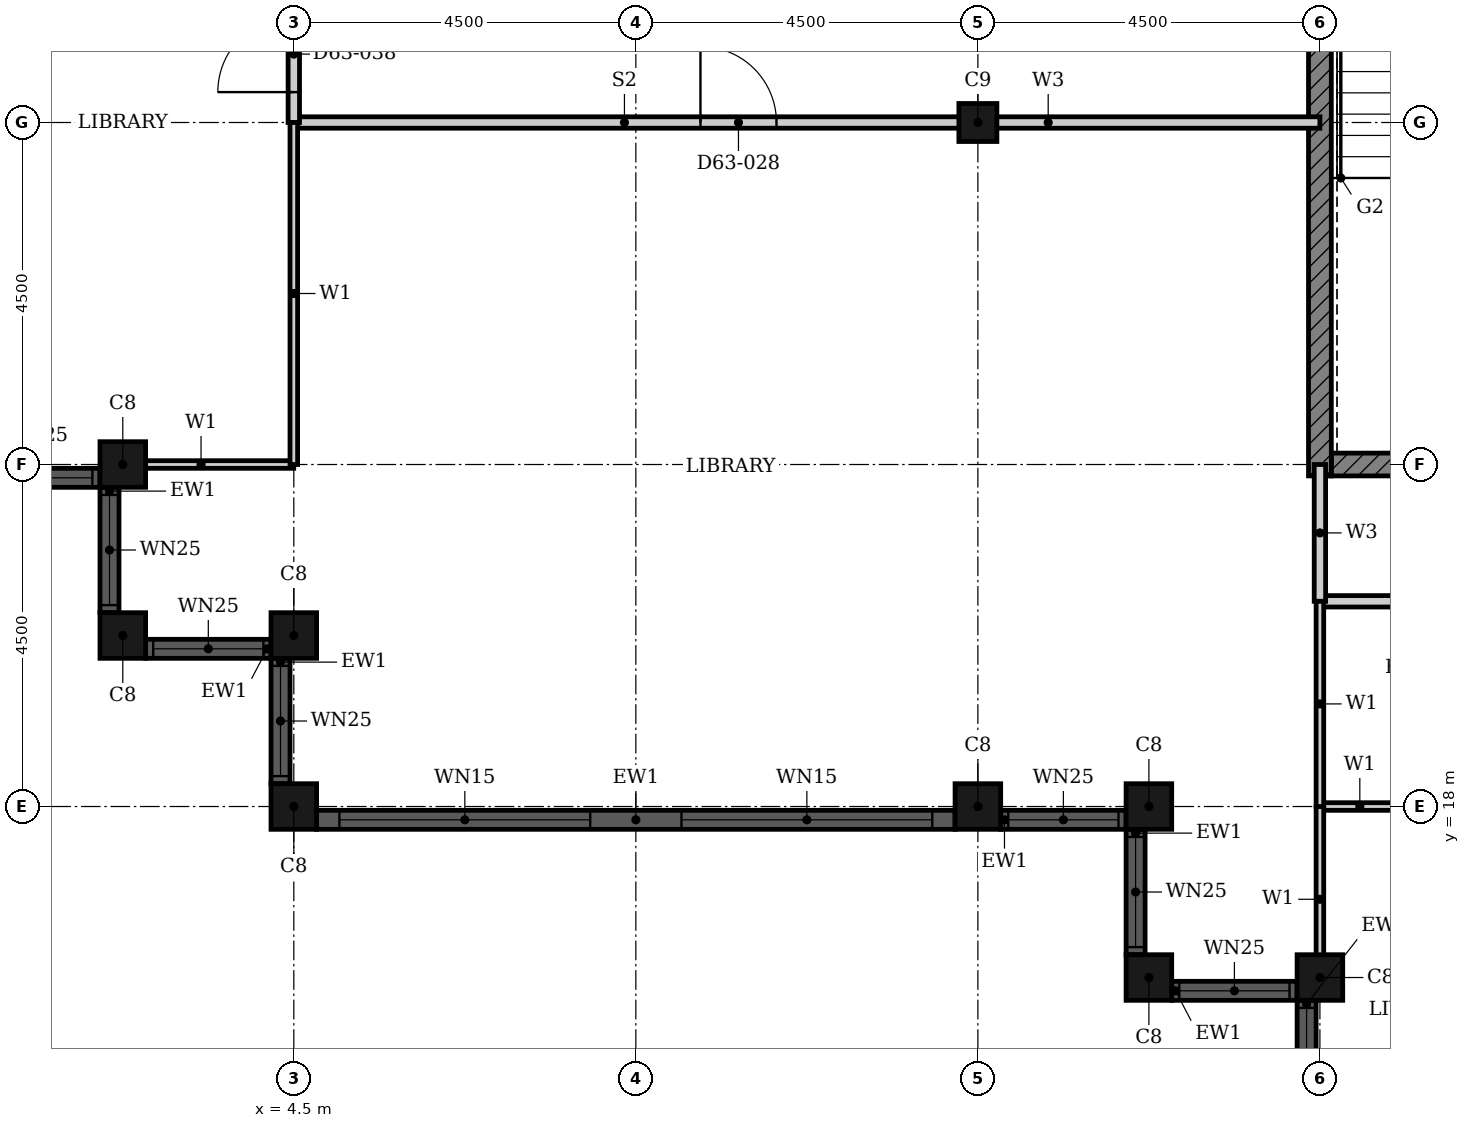
"""IFC4 building model, lengths in metres.
Left out: names, types, materials, properties, quantities, classifications, styles, units other than length and angle.
Written with IfcOpenShell. Run it as: python <this file> out.ifc"""

import sys

from ifc_helpers import new_model, si_unit, direction, frame, frame_2d, origin, origin_2d, place, context, subcontext, project, spatial, rectangle, hollow_rectangle, extrude, element, fill, save


model = new_model("IFC4")
c1 = context("Model", 3, precision=1e-05, world=origin(), true_north=direction((0.0, 1.0)))
c2 = subcontext(c1, "Body", "Model", "MODEL_VIEW")
j1 = project(units=[si_unit("LENGTHUNIT", "METRE"), si_unit("PLANEANGLEUNIT", "RADIAN")], contexts=[c1])
p1 = place(None, origin())
s1 = spatial("IfcSite", under=j1, at=p1, CompositionType="ELEMENT")
p2 = place(p1, origin())
s2 = spatial("IfcBuilding", under=s1, at=p2, CompositionType="ELEMENT")
p3 = place(p2, frame((0.0, 0.0, 249.0)))
s3 = spatial("IfcBuildingStorey", under=s2, at=p3, CompositionType="ELEMENT", Elevation=249.0)
for number, where, z_axis, x_axis in (
    (1, (15.75, 18.0, 0.0), (0.0, 0.0, 1.0), (1.0, 0.0, 0.0)),
    (2, (15.75, 15.75, 0.0), (0.0, 0.0, 1.0), (1.0, 0.0, 0.0)),
    (3, (18.0, 15.75, 0.0), (0.0, 0.0, 1.0), (1.0, 0.0, 0.0)),
    (4, (2.25, 22.5, 0.0), (0.0, 0.0, 1.0), (1.0, 0.0, 0.0)),
    (5, (2.25, 20.25, 0.0), (0.0, 0.0, 1.0), (1.0, 0.0, 0.0)),
    (6, (4.5, 20.25, 0.0), (0.0, 0.0, 1.0), (1.0, 0.0, 0.0)),
    (7, (4.5, 18.0, 0.0), (0.0, 0.0, 1.0), (1.0, 0.0, 0.0)),
    (8, (13.5, 18.0, 0.0), (0.0, 0.0, 1.0), (1.0, 0.0, 0.0)),
):
    element("IfcColumn", number, at=place(p3, frame(where, z_axis=z_axis, x_axis=x_axis)), inside=s3, PredefinedType="COLUMN", context=c2, shape_type="SweptSolid", body=[
        extrude(hollow_rectangle(XDim=0.6, YDim=0.6, WallThickness=0.02, at=origin_2d()), origin(), (0.0, 0.0, 1.0), 3.7),
    ])
p4 = place(p3, frame((13.5, 27.0, 0.0), z_axis=(0.0, 0.0, 1.0), x_axis=(1.0, 0.0, 0.0)))
e9 = element("IfcColumn", 9, at=p4, inside=s3, PredefinedType="COLUMN", context=c2, shape_type="SweptSolid", body=[
    extrude(hollow_rectangle(XDim=0.5, YDim=0.5, WallThickness=0.016, InnerFilletRadius=0.032, OuterFilletRadius=0.048, at=origin_2d()), origin(), (0.0, 0.0, 1.0), 3.7),
])
p5 = place(p3, frame((15.575, 17.7, 0.0), z_axis=(0.0, 0.0, 1.0), x_axis=(0.0, -1.0, 0.0)))
e10 = element("IfcWall", 10, at=p5, inside=s3, PredefinedType="SOLIDWALL", context=c2, shape_type="SweptSolid", body=[
    extrude(rectangle(XDim=1.65, YDim=0.25, at=frame_2d((0.825, 0.0))), origin(), (0.0, 0.0, 1.0), 3.7),
])
p6 = place(p5, frame((0.1, 0.0, 0.9)))
e11 = element("IfcOpeningElement", 11, at=p6, cuts=e10, PredefinedType="OPENING", context=c2, shape_type="SweptSolid", body=[
    extrude(rectangle(XDim=1.45, YDim=1.85, at=frame_2d((0.725, 0.925))), frame((0.0, 0.135, 0.0), z_axis=(0.0, -1.0, 0.0), x_axis=(1.0, 0.0, 0.0)), (0.0, 0.0, 1.0), 0.27),
])
p7 = place(p3, frame((16.05, 15.575, 0.0), z_axis=(0.0, 0.0, 1.0), x_axis=(1.0, 0.0, 0.0)))
e12 = element("IfcWall", 12, at=p7, inside=s3, PredefinedType="SOLIDWALL", context=c2, shape_type="SweptSolid", body=[
    extrude(rectangle(XDim=1.65, YDim=0.25, at=frame_2d((0.825, 0.0))), origin(), (0.0, 0.0, 1.0), 3.7),
])
p8 = place(p7, frame((0.1, 0.0, 0.9)))
e13 = element("IfcOpeningElement", 13, at=p8, cuts=e12, PredefinedType="OPENING", context=c2, shape_type="SweptSolid", body=[
    extrude(rectangle(XDim=1.45, YDim=1.85, at=frame_2d((0.725, 0.925))), frame((0.0, 0.135, 0.0), z_axis=(0.0, -1.0, 0.0), x_axis=(1.0, 0.0, 0.0)), (0.0, 0.0, 1.0), 0.27),
])
p9 = place(p3, frame((17.825, 15.45, 0.0), z_axis=(0.0, 0.0, 1.0), x_axis=(0.0, -1.0, 0.0)))
e14 = element("IfcWall", 14, at=p9, inside=s3, PredefinedType="SOLIDWALL", context=c2, shape_type="SweptSolid", body=[
    extrude(rectangle(XDim=1.65, YDim=0.25, at=frame_2d((0.825, 0.0))), origin(), (0.0, 0.0, 1.0), 3.7),
])
p10 = place(p9, frame((0.1, 0.0, 0.9)))
e15 = element("IfcOpeningElement", 15, at=p10, cuts=e14, PredefinedType="OPENING", context=c2, shape_type="SweptSolid", body=[
    extrude(rectangle(XDim=1.45, YDim=1.85, at=frame_2d((0.725, 0.925))), frame((0.0, 0.135, 0.0), z_axis=(0.0, -1.0, 0.0), x_axis=(1.0, 0.0, 0.0)), (0.0, 0.0, 1.0), 0.27),
])
p11 = place(p3, frame((0.3, 22.325, 0.0), z_axis=(0.0, 0.0, 1.0), x_axis=(1.0, 0.0, 0.0)))
e16 = element("IfcWall", 16, at=p11, inside=s3, PredefinedType="SOLIDWALL", context=c2, shape_type="SweptSolid", body=[
    extrude(rectangle(XDim=1.65, YDim=0.25, at=frame_2d((0.825, 0.0))), origin(), (0.0, 0.0, 1.0), 3.7),
])
p12 = place(p11, frame((0.1, 0.0, 0.9)))
e17 = element("IfcOpeningElement", 17, at=p12, cuts=e16, PredefinedType="OPENING", context=c2, shape_type="SweptSolid", body=[
    extrude(rectangle(XDim=1.45, YDim=1.85, at=frame_2d((0.725, 0.925))), frame((0.0, 0.135, 0.0), z_axis=(0.0, -1.0, 0.0), x_axis=(1.0, 0.0, 0.0)), (0.0, 0.0, 1.0), 0.27),
])
p13 = place(p3, frame((2.075, 22.2, 0.0), z_axis=(0.0, 0.0, 1.0), x_axis=(0.0, -1.0, 0.0)))
e18 = element("IfcWall", 18, at=p13, inside=s3, PredefinedType="SOLIDWALL", context=c2, shape_type="SweptSolid", body=[
    extrude(rectangle(XDim=1.65, YDim=0.25, at=frame_2d((0.825, 0.0))), origin(), (0.0, 0.0, 1.0), 3.7),
])
p14 = place(p13, frame((0.1, 0.0, 0.9)))
e19 = element("IfcOpeningElement", 19, at=p14, cuts=e18, PredefinedType="OPENING", context=c2, shape_type="SweptSolid", body=[
    extrude(rectangle(XDim=1.45, YDim=1.85, at=frame_2d((0.725, 0.925))), frame((0.0, 0.135, 0.0), z_axis=(0.0, -1.0, 0.0), x_axis=(1.0, 0.0, 0.0)), (0.0, 0.0, 1.0), 0.27),
])
p15 = place(p3, frame((2.55, 20.075, 0.0), z_axis=(0.0, 0.0, 1.0), x_axis=(1.0, 0.0, 0.0)))
e20 = element("IfcWall", 20, at=p15, inside=s3, PredefinedType="SOLIDWALL", context=c2, shape_type="SweptSolid", body=[
    extrude(rectangle(XDim=1.65, YDim=0.25, at=frame_2d((0.825, 0.0))), origin(), (0.0, 0.0, 1.0), 3.7),
])
p16 = place(p15, frame((0.1, 0.0, 0.9)))
e21 = element("IfcOpeningElement", 21, at=p16, cuts=e20, PredefinedType="OPENING", context=c2, shape_type="SweptSolid", body=[
    extrude(rectangle(XDim=1.45, YDim=1.85, at=frame_2d((0.725, 0.925))), frame((0.0, 0.135, 0.0), z_axis=(0.0, -1.0, 0.0), x_axis=(1.0, 0.0, 0.0)), (0.0, 0.0, 1.0), 0.27),
])
p17 = place(p3, frame((4.325, 19.95, 0.0), z_axis=(0.0, 0.0, 1.0), x_axis=(0.0, -1.0, 0.0)))
e22 = element("IfcWall", 22, at=p17, inside=s3, PredefinedType="SOLIDWALL", context=c2, shape_type="SweptSolid", body=[
    extrude(rectangle(XDim=1.65, YDim=0.25, at=frame_2d((0.825, 0.0))), origin(), (0.0, 0.0, 1.0), 3.7),
])
p18 = place(p17, frame((0.1, 0.0, 0.9)))
e23 = element("IfcOpeningElement", 23, at=p18, cuts=e22, PredefinedType="OPENING", context=c2, shape_type="SweptSolid", body=[
    extrude(rectangle(XDim=1.45, YDim=1.85, at=frame_2d((0.725, 0.925))), frame((0.0, 0.135, 0.0), z_axis=(0.0, -1.0, 0.0), x_axis=(1.0, 0.0, 0.0)), (0.0, 0.0, 1.0), 0.27),
])
p19 = place(p3, frame((4.8, 17.825, 0.0), z_axis=(0.0, 0.0, 1.0), x_axis=(1.0, 0.0, 0.0)))
e24 = element("IfcWall", 24, at=p19, inside=s3, PredefinedType="SOLIDWALL", context=c2, shape_type="SweptSolid", body=[
    extrude(rectangle(XDim=8.4, YDim=0.25, at=frame_2d((4.2, 0.0))), origin(), (0.0, 0.0, 1.0), 3.7),
])
p20 = place(p19, frame((0.3, 0.0, 0.45)))
e25 = element("IfcOpeningElement", 25, at=p20, cuts=e24, PredefinedType="OPENING", context=c2, shape_type="SweptSolid", body=[
    extrude(rectangle(XDim=3.3, YDim=2.3, at=frame_2d((1.65, 1.15))), frame((0.0, 0.135, 0.0), z_axis=(0.0, -1.0, 0.0), x_axis=(1.0, 0.0, 0.0)), (0.0, 0.0, 1.0), 0.27),
])
p21 = place(p19, frame((4.8, 0.0, 0.45)))
e26 = element("IfcOpeningElement", 26, at=p21, cuts=e24, PredefinedType="OPENING", context=c2, shape_type="SweptSolid", body=[
    extrude(rectangle(XDim=3.3, YDim=2.3, at=frame_2d((1.65, 1.15))), frame((0.0, 0.135, 0.0), z_axis=(0.0, -1.0, 0.0), x_axis=(1.0, 0.0, 0.0)), (0.0, 0.0, 1.0), 0.27),
])
p22 = place(p3, frame((13.8, 17.825, 0.0), z_axis=(0.0, 0.0, 1.0), x_axis=(1.0, 0.0, 0.0)))
e27 = element("IfcWall", 27, at=p22, inside=s3, PredefinedType="SOLIDWALL", context=c2, shape_type="SweptSolid", body=[
    extrude(rectangle(XDim=1.65, YDim=0.25, at=frame_2d((0.825, 0.0))), origin(), (0.0, 0.0, 1.0), 3.7),
])
p23 = place(p22, frame((0.1, 0.0, 0.9)))
e28 = element("IfcOpeningElement", 28, at=p23, cuts=e27, PredefinedType="OPENING", context=c2, shape_type="SweptSolid", body=[
    extrude(rectangle(XDim=1.45, YDim=1.85, at=frame_2d((0.725, 0.925))), frame((0.0, 0.135, 0.0), z_axis=(0.0, -1.0, 0.0), x_axis=(1.0, 0.0, 0.0)), (0.0, 0.0, 1.0), 0.27),
])
p24 = place(p3, frame((18.15, 22.5, 0.0), z_axis=(0.0, 0.0, 1.0), x_axis=(1.0, 0.0, 0.0)))
e29 = element("IfcWall", 29, at=p24, inside=s3, PredefinedType="SHEAR", context=c2, shape_type="SweptSolid", body=[
    extrude(rectangle(XDim=4.225, YDim=0.3, at=frame_2d((2.113, 0.0))), origin(), (0.0, 0.0, 1.0), 3.4),
])
p25 = place(p3, frame((18.0, 22.35, 0.0), z_axis=(0.0, 0.0, 1.0), x_axis=(0.0, 1.0, 0.0)))
e30 = element("IfcWall", 30, at=p25, inside=s3, PredefinedType="SHEAR", context=c2, shape_type="SweptSolid", body=[
    extrude(rectangle(XDim=9.3, YDim=0.3, at=frame_2d((4.65, 0.0))), origin(), (0.0, 0.0, 1.0), 3.4),
])
p26 = place(p3, frame((18.0, 20.7, 0.0), z_axis=(0.0, 0.0, 1.0), x_axis=(1.0, 0.0, 0.0)))
e31 = element("IfcWall", 31, at=p26, inside=s3, PredefinedType="PARTITIONING", context=c2, shape_type="SweptSolid", body=[
    extrude(rectangle(XDim=6.6, YDim=0.15, at=frame_2d((3.3, 0.0))), origin(), (0.0, 0.0, 1.0), 3.4),
])
p27 = place(p26, frame((4.3, 0.0, 0.0)))
e32 = element("IfcOpeningElement", 32, at=p27, cuts=e31, PredefinedType="OPENING", context=c2, shape_type="SweptSolid", body=[
    extrude(rectangle(XDim=1.0, YDim=2.2, at=frame_2d((0.5, 1.1))), frame((0.0, 0.085, 0.0), z_axis=(0.0, -1.0, 0.0), x_axis=(1.0, 0.0, 0.0)), (0.0, 0.0, 1.0), 0.17),
])
p28 = place(p3, frame((4.5, 27.0, 0.0), z_axis=(0.0, 0.0, 1.0), x_axis=(1.0, 0.0, 0.0)))
e33 = element("IfcWall", 33, at=p28, inside=s3, PredefinedType="PARTITIONING", context=c2, shape_type="SweptSolid", body=[
    extrude(rectangle(XDim=13.5, YDim=0.15, at=frame_2d((6.75, 0.0))), origin(), (0.0, 0.0, 1.0), 2.68),
])
p29 = place(p28, frame((5.35, 0.0, 0.0)))
e34 = element("IfcOpeningElement", 34, at=p29, cuts=e33, PredefinedType="OPENING", context=c2, shape_type="SweptSolid", body=[
    extrude(rectangle(XDim=1.0, YDim=2.1, at=frame_2d((0.5, 1.05))), frame((0.0, 0.085, 0.0), z_axis=(0.0, -1.0, 0.0), x_axis=(1.0, 0.0, 0.0)), (0.0, 0.0, 1.0), 0.17),
])
p30 = place(p3, frame((18.0, 20.7, 0.0), z_axis=(0.0, 0.0, 1.0), x_axis=(0.0, 1.0, 0.0)))
e35 = element("IfcWall", 35, at=p30, inside=s3, PredefinedType="PARTITIONING", context=c2, shape_type="SweptSolid", body=[
    extrude(rectangle(XDim=1.8, YDim=0.15, at=frame_2d((0.9, 0.0))), origin(), (0.0, 0.0, 1.0), 3.4),
])
p31 = place(p3, frame((4.5, 27.0, 0.0), z_axis=(0.0, 0.0, 1.0), x_axis=(0.0, 1.0, 0.0)))
e36 = element("IfcWall", 36, at=p31, inside=s3, PredefinedType="PARTITIONING", context=c2, shape_type="SweptSolid", body=[
    extrude(rectangle(XDim=1.8, YDim=0.15, at=frame_2d((0.9, 0.0))), origin(), (0.0, 0.0, 1.0), 3.4),
])
p32 = place(p31, frame((0.4, 0.0, 0.0)))
e37 = element("IfcOpeningElement", 37, at=p32, cuts=e36, PredefinedType="OPENING", context=c2, shape_type="SweptSolid", body=[
    extrude(rectangle(XDim=1.0, YDim=2.1, at=frame_2d((0.5, 1.05))), frame((0.0, 0.085, 0.0), z_axis=(0.0, -1.0, 0.0), x_axis=(1.0, 0.0, 0.0)), (0.0, 0.0, 1.0), 0.17),
])
p33 = place(p3, frame((18.0, 18.0, 0.0), z_axis=(0.0, 0.0, 1.0), x_axis=(1.0, 0.0, 0.0)))
e38 = element("IfcWall", 38, at=p33, inside=s3, PredefinedType="PARTITIONING", context=c2, shape_type="SweptSolid", body=[
    extrude(rectangle(XDim=3.0, YDim=0.1, at=frame_2d((1.5, 0.0))), origin(), (0.0, 0.0, 1.0), 3.4),
])
p34 = place(p33, frame((1.05, 0.0, 0.0)))
e39 = element("IfcOpeningElement", 39, at=p34, cuts=e38, PredefinedType="OPENING", context=c2, shape_type="SweptSolid", body=[
    extrude(rectangle(XDim=0.9, YDim=2.1, at=frame_2d((0.45, 1.05))), frame((0.0, 0.06, 0.0), z_axis=(0.0, -1.0, 0.0), x_axis=(1.0, 0.0, 0.0)), (0.0, 0.0, 1.0), 0.12),
])
p35 = place(p3, frame((2.06, 22.5, 0.0), z_axis=(0.0, 0.0, 1.0), x_axis=(1.0, 0.0, 0.0)))
e40 = element("IfcWall", 40, at=p35, inside=s3, PredefinedType="PARTITIONING", context=c2, shape_type="SweptSolid", body=[
    extrude(rectangle(XDim=2.439, YDim=0.1, at=frame_2d((1.219, 0.0))), origin(), (0.0, 0.0, 1.0), 2.68),
])
p36 = place(p3, frame((18.0, 15.56, 0.0), z_axis=(0.0, 0.0, 1.0), x_axis=(0.0, 1.0, 0.0)))
e41 = element("IfcWall", 41, at=p36, inside=s3, PredefinedType="PARTITIONING", context=c2, shape_type="SweptSolid", body=[
    extrude(rectangle(XDim=2.439, YDim=0.1, at=frame_2d((1.219, 0.0))), origin(), (0.0, 0.0, 1.0), 3.4),
])
p37 = place(p3, frame((18.0, 18.0, 0.0), z_axis=(0.0, 0.0, 1.0), x_axis=(0.0, 1.0, 0.0)))
e42 = element("IfcWall", 42, at=p37, inside=s3, PredefinedType="PARTITIONING", context=c2, shape_type="SweptSolid", body=[
    extrude(rectangle(XDim=2.7, YDim=0.1, at=frame_2d((1.35, 0.0))), origin(), (0.0, 0.0, 1.0), 3.4),
])
p38 = place(p3, frame((4.5, 22.5, 0.0), z_axis=(0.0, 0.0, 1.0), x_axis=(0.0, 1.0, 0.0)))
e43 = element("IfcWall", 43, at=p38, inside=s3, PredefinedType="PARTITIONING", context=c2, shape_type="SweptSolid", body=[
    extrude(rectangle(XDim=4.5, YDim=0.1, at=frame_2d((2.25, 0.0))), origin(), (0.0, 0.0, 1.0), 3.4),
])
p39 = place(p6, origin())
e44 = element("IfcWindow", 44, at=p39, inside=s3, PartitioningType="SINGLE_PANEL", PredefinedType="WINDOW", context=c2, shape_type="SweptSolid", body=[
    extrude(rectangle(XDim=1.45, YDim=1.85, at=frame_2d((0.725, 0.925))), frame((0.0, 0.03, 0.0), z_axis=(0.0, -1.0, 0.0), x_axis=(1.0, 0.0, 0.0)), (0.0, 0.0, 1.0), 0.06),
])
fill(e11, e44)
p40 = place(p8, origin())
e45 = element("IfcWindow", 45, at=p40, inside=s3, PartitioningType="SINGLE_PANEL", PredefinedType="WINDOW", context=c2, shape_type="SweptSolid", body=[
    extrude(rectangle(XDim=1.45, YDim=1.85, at=frame_2d((0.725, 0.925))), frame((0.0, 0.03, 0.0), z_axis=(0.0, -1.0, 0.0), x_axis=(1.0, 0.0, 0.0)), (0.0, 0.0, 1.0), 0.06),
])
fill(e13, e45)
p41 = place(p10, origin())
e46 = element("IfcWindow", 46, at=p41, inside=s3, PartitioningType="SINGLE_PANEL", PredefinedType="WINDOW", context=c2, shape_type="SweptSolid", body=[
    extrude(rectangle(XDim=1.45, YDim=1.85, at=frame_2d((0.725, 0.925))), frame((0.0, 0.03, 0.0), z_axis=(0.0, -1.0, 0.0), x_axis=(1.0, 0.0, 0.0)), (0.0, 0.0, 1.0), 0.06),
])
fill(e15, e46)
p42 = place(p12, origin())
e47 = element("IfcWindow", 47, at=p42, inside=s3, PartitioningType="SINGLE_PANEL", PredefinedType="WINDOW", context=c2, shape_type="SweptSolid", body=[
    extrude(rectangle(XDim=1.45, YDim=1.85, at=frame_2d((0.725, 0.925))), frame((0.0, 0.03, 0.0), z_axis=(0.0, -1.0, 0.0), x_axis=(1.0, 0.0, 0.0)), (0.0, 0.0, 1.0), 0.06),
])
fill(e17, e47)
p43 = place(p14, origin())
e48 = element("IfcWindow", 48, at=p43, inside=s3, PartitioningType="SINGLE_PANEL", PredefinedType="WINDOW", context=c2, shape_type="SweptSolid", body=[
    extrude(rectangle(XDim=1.45, YDim=1.85, at=frame_2d((0.725, 0.925))), frame((0.0, 0.03, 0.0), z_axis=(0.0, -1.0, 0.0), x_axis=(1.0, 0.0, 0.0)), (0.0, 0.0, 1.0), 0.06),
])
fill(e19, e48)
p44 = place(p16, origin())
e49 = element("IfcWindow", 49, at=p44, inside=s3, PartitioningType="SINGLE_PANEL", PredefinedType="WINDOW", context=c2, shape_type="SweptSolid", body=[
    extrude(rectangle(XDim=1.45, YDim=1.85, at=frame_2d((0.725, 0.925))), frame((0.0, 0.03, 0.0), z_axis=(0.0, -1.0, 0.0), x_axis=(1.0, 0.0, 0.0)), (0.0, 0.0, 1.0), 0.06),
])
fill(e21, e49)
p45 = place(p18, origin())
e50 = element("IfcWindow", 50, at=p45, inside=s3, PartitioningType="SINGLE_PANEL", PredefinedType="WINDOW", context=c2, shape_type="SweptSolid", body=[
    extrude(rectangle(XDim=1.45, YDim=1.85, at=frame_2d((0.725, 0.925))), frame((0.0, 0.03, 0.0), z_axis=(0.0, -1.0, 0.0), x_axis=(1.0, 0.0, 0.0)), (0.0, 0.0, 1.0), 0.06),
])
fill(e23, e50)
p46 = place(p20, origin())
e51 = element("IfcWindow", 51, at=p46, inside=s3, PartitioningType="SINGLE_PANEL", PredefinedType="WINDOW", context=c2, shape_type="SweptSolid", body=[
    extrude(rectangle(XDim=3.3, YDim=2.3, at=frame_2d((1.65, 1.15))), frame((0.0, 0.03, 0.0), z_axis=(0.0, -1.0, 0.0), x_axis=(1.0, 0.0, 0.0)), (0.0, 0.0, 1.0), 0.06),
])
fill(e25, e51)
p47 = place(p21, origin())
e52 = element("IfcWindow", 52, at=p47, inside=s3, PartitioningType="SINGLE_PANEL", PredefinedType="WINDOW", context=c2, shape_type="SweptSolid", body=[
    extrude(rectangle(XDim=3.3, YDim=2.3, at=frame_2d((1.65, 1.15))), frame((0.0, 0.03, 0.0), z_axis=(0.0, -1.0, 0.0), x_axis=(1.0, 0.0, 0.0)), (0.0, 0.0, 1.0), 0.06),
])
fill(e26, e52)
p48 = place(p23, origin())
e53 = element("IfcWindow", 53, at=p48, inside=s3, PartitioningType="SINGLE_PANEL", PredefinedType="WINDOW", context=c2, shape_type="SweptSolid", body=[
    extrude(rectangle(XDim=1.45, YDim=1.85, at=frame_2d((0.725, 0.925))), frame((0.0, 0.03, 0.0), z_axis=(0.0, -1.0, 0.0), x_axis=(1.0, 0.0, 0.0)), (0.0, 0.0, 1.0), 0.06),
])
fill(e28, e53)
p49 = place(p29, origin())
e54 = element("IfcDoor", 54, at=p49, inside=s3, OperationType="SINGLE_SWING_LEFT", PredefinedType="DOOR", context=c2, shape_type="SweptSolid", body=[
    extrude(rectangle(XDim=1.0, YDim=2.1, at=frame_2d((0.5, 1.05))), frame((0.0, 0.025, 0.0), z_axis=(0.0, -1.0, 0.0), x_axis=(1.0, 0.0, 0.0)), (0.0, 0.0, 1.0), 0.05),
])
fill(e34, e54)
p50 = place(p32, origin())
e55 = element("IfcDoor", 55, at=p50, inside=s3, OperationType="SINGLE_SWING_LEFT", PredefinedType="DOOR", context=c2, shape_type="SweptSolid", body=[
    extrude(rectangle(XDim=1.0, YDim=2.1, at=frame_2d((0.5, 1.05))), frame((0.0, 0.025, 0.0), z_axis=(0.0, -1.0, 0.0), x_axis=(1.0, 0.0, 0.0)), (0.0, 0.0, 1.0), 0.05),
])
fill(e37, e55)
save(model, sys.argv[1])
